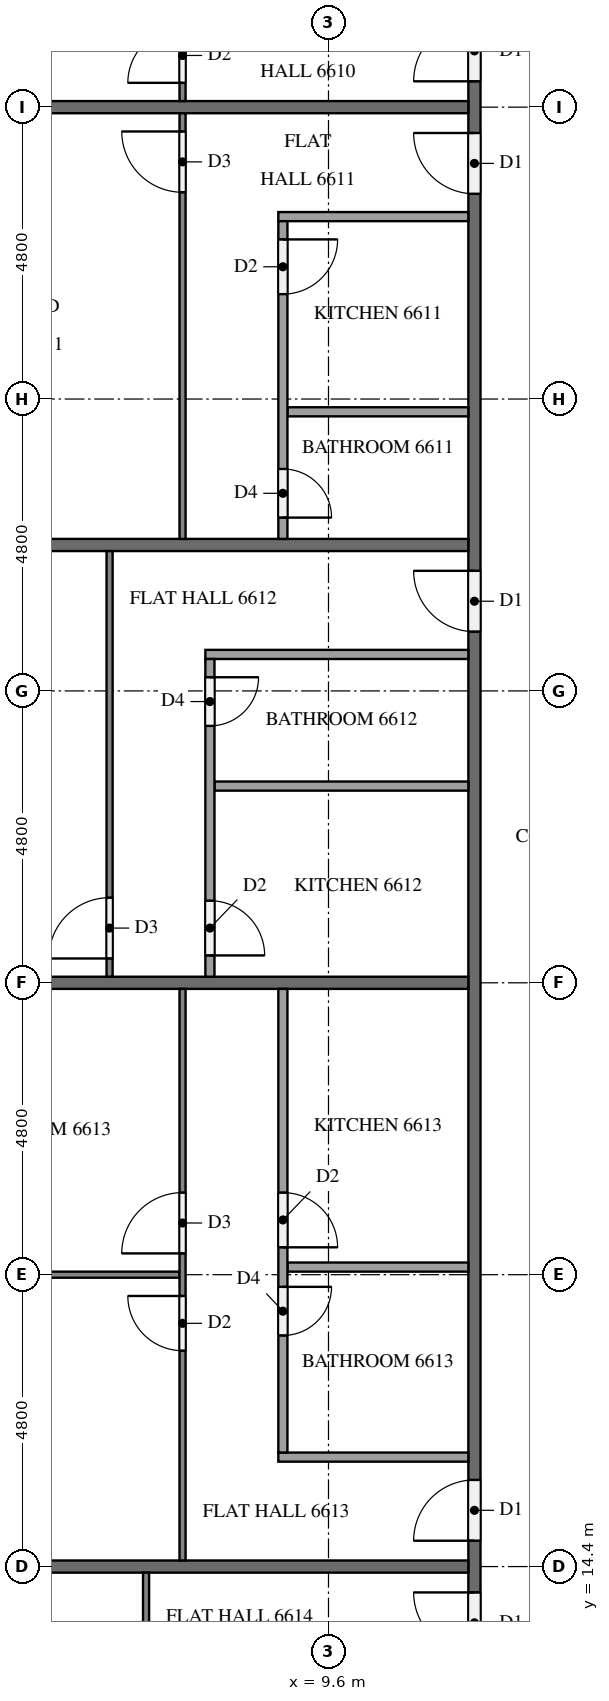
"""IFC4 building model, lengths in metres.
Left out: names, types, materials, properties, quantities, classifications, styles, units other than length and angle.
Written with IfcOpenShell. Run it as: python <this file> out.ifc"""

import sys

from ifc_helpers import new_model, si_unit, direction, frame, frame_2d, origin, place, context, subcontext, project, spatial, rectangle, extrude, element, fill, save


model = new_model("IFC4")
c1 = context("Model", 3, precision=1e-05, world=origin(), true_north=direction((0.0, 1.0)))
c2 = subcontext(c1, "Body", "Model", "MODEL_VIEW")
j1 = project(units=[si_unit("LENGTHUNIT", "METRE"), si_unit("PLANEANGLEUNIT", "RADIAN")], contexts=[c1])
p1 = place(None, origin())
s1 = spatial("IfcSite", under=j1, at=p1, CompositionType="ELEMENT")
p2 = place(p1, origin())
s2 = spatial("IfcBuilding", under=s1, at=p2, CompositionType="ELEMENT")
p3 = place(p2, frame((0.0, 0.0, 252.7)))
s3 = spatial("IfcBuildingStorey", under=s2, at=p3, CompositionType="ELEMENT", Elevation=252.7)
p4 = place(p3, frame((12.0, 12.1, 0.0), z_axis=(0.0, 0.0, 1.0), x_axis=(0.0, 1.0, 0.0)))
e1 = element("IfcWall", 1, at=p4, inside=s3, PredefinedType="PARTITIONING", context=c2, shape_type="SweptSolid", body=[
    extrude(rectangle(XDim=28.6, YDim=0.2, at=frame_2d((14.3, 0.0))), origin(), (0.0, 0.0, 1.0), 3.2),
])
p5 = place(p4, frame((26.725, 0.0, 0.0)))
e2 = element("IfcOpeningElement", 2, at=p5, cuts=e1, PredefinedType="OPENING", context=c2, shape_type="SweptSolid", body=[
    extrude(rectangle(XDim=1.0, YDim=2.1, at=frame_2d((0.5, 1.05))), frame((0.0, 0.11, 0.0), z_axis=(0.0, -1.0, 0.0), x_axis=(1.0, 0.0, 0.0)), (0.0, 0.0, 1.0), 0.22),
])
p6 = place(p4, frame((24.875, 0.0, 0.0)))
e3 = element("IfcOpeningElement", 3, at=p6, cuts=e1, PredefinedType="OPENING", context=c2, shape_type="SweptSolid", body=[
    extrude(rectangle(XDim=1.0, YDim=2.1, at=frame_2d((0.5, 1.05))), frame((0.0, 0.11, 0.0), z_axis=(0.0, -1.0, 0.0), x_axis=(1.0, 0.0, 0.0)), (0.0, 0.0, 1.0), 0.22),
])
p7 = place(p4, frame((17.675, 0.0, 0.0)))
e4 = element("IfcOpeningElement", 4, at=p7, cuts=e1, PredefinedType="OPENING", context=c2, shape_type="SweptSolid", body=[
    extrude(rectangle(XDim=1.0, YDim=2.1, at=frame_2d((0.5, 1.05))), frame((0.0, 0.11, 0.0), z_axis=(0.0, -1.0, 0.0), x_axis=(1.0, 0.0, 0.0)), (0.0, 0.0, 1.0), 0.22),
])
p8 = place(p4, frame((2.725, 0.0, 0.0)))
e5 = element("IfcOpeningElement", 5, at=p8, cuts=e1, PredefinedType="OPENING", context=c2, shape_type="SweptSolid", body=[
    extrude(rectangle(XDim=1.0, YDim=2.1, at=frame_2d((0.5, 1.05))), frame((0.0, 0.11, 0.0), z_axis=(0.0, -1.0, 0.0), x_axis=(1.0, 0.0, 0.0)), (0.0, 0.0, 1.0), 0.22),
])
p9 = place(p4, frame((0.875, 0.0, 0.0)))
e6 = element("IfcOpeningElement", 6, at=p9, cuts=e1, PredefinedType="OPENING", context=c2, shape_type="SweptSolid", body=[
    extrude(rectangle(XDim=1.0, YDim=2.1, at=frame_2d((0.5, 1.05))), frame((0.0, 0.11, 0.0), z_axis=(0.0, -1.0, 0.0), x_axis=(1.0, 0.0, 0.0)), (0.0, 0.0, 1.0), 0.22),
])
p10 = place(p3, frame((0.275, 38.4, 0.0), z_axis=(0.0, 0.0, 1.0), x_axis=(1.0, 0.0, 0.0)))
e7 = element("IfcWall", 7, at=p10, inside=s3, PredefinedType="PARTITIONING", context=c2, shape_type="SweptSolid", body=[
    extrude(rectangle(XDim=11.625, YDim=0.2, at=frame_2d((5.812, 0.0))), origin(), (0.0, 0.0, 1.0), 3.2),
])
for number, where, z_axis, x_axis in (
    (8, (0.1, 31.2, 0.0), (0.0, 0.0, 1.0), (1.0, 0.0, 0.0)),
    (9, (0.1, 24.0, 0.0), (0.0, 0.0, 1.0), (1.0, 0.0, 0.0)),
    (10, (0.1, 14.4, 0.0), (0.0, 0.0, 1.0), (1.0, 0.0, 0.0)),
):
    element("IfcWall", number, at=place(p3, frame(where, z_axis=z_axis, x_axis=x_axis)), inside=s3, PredefinedType="PARTITIONING", context=c2, shape_type="SweptSolid", body=[
        extrude(rectangle(XDim=11.8, YDim=0.2, at=frame_2d((5.9, 0.0))), origin(), (0.0, 0.0, 1.0), 3.2),
    ])
p11 = place(p3, frame((7.2, 38.5, 0.0), z_axis=(0.0, 0.0, 1.0), x_axis=(0.0, 1.0, 0.0)))
e11 = element("IfcWall", 11, at=p11, inside=s3, PredefinedType="PARTITIONING", context=c2, shape_type="SweptSolid", body=[
    extrude(rectangle(XDim=14.2, YDim=0.1, at=frame_2d((7.1, 0.0))), origin(), (0.0, 0.0, 1.0), 3.2),
])
p12 = place(p11, frame((0.3, 0.0, 0.0)))
e12 = element("IfcOpeningElement", 12, at=p12, cuts=e11, PredefinedType="OPENING", context=c2, shape_type="SweptSolid", body=[
    extrude(rectangle(XDim=0.9, YDim=2.1, at=frame_2d((0.45, 1.05))), frame((0.0, 0.06, 0.0), z_axis=(0.0, -1.0, 0.0), x_axis=(1.0, 0.0, 0.0)), (0.0, 0.0, 1.0), 0.12),
])
p13 = place(p11, frame((8.25, 0.0, 0.0)))
e13 = element("IfcOpeningElement", 13, at=p13, cuts=e11, PredefinedType="OPENING", context=c2, shape_type="SweptSolid", body=[
    extrude(rectangle(XDim=0.9, YDim=2.1, at=frame_2d((0.45, 1.05))), frame((0.0, 0.06, 0.0), z_axis=(0.0, -1.0, 0.0), x_axis=(1.0, 0.0, 0.0)), (0.0, 0.0, 1.0), 0.12),
])
p14 = place(p11, frame((9.85, 0.0, 0.0)))
e14 = element("IfcOpeningElement", 14, at=p14, cuts=e11, PredefinedType="OPENING", context=c2, shape_type="SweptSolid", body=[
    extrude(rectangle(XDim=1.0, YDim=2.1, at=frame_2d((0.5, 1.05))), frame((0.0, 0.06, 0.0), z_axis=(0.0, -1.0, 0.0), x_axis=(1.0, 0.0, 0.0)), (0.0, 0.0, 1.0), 0.12),
])
p15 = place(p3, frame((7.2, 31.3, 0.0), z_axis=(0.0, 0.0, 1.0), x_axis=(0.0, 1.0, 0.0)))
e15 = element("IfcWall", 15, at=p15, inside=s3, PredefinedType="PARTITIONING", context=c2, shape_type="SweptSolid", body=[
    extrude(rectangle(XDim=7.0, YDim=0.1, at=frame_2d((3.5, 0.0))), origin(), (0.0, 0.0, 1.0), 3.2),
])
p16 = place(p15, frame((5.7, 0.0, 0.0)))
e16 = element("IfcOpeningElement", 16, at=p16, cuts=e15, PredefinedType="OPENING", context=c2, shape_type="SweptSolid", body=[
    extrude(rectangle(XDim=1.0, YDim=2.1, at=frame_2d((0.5, 1.05))), frame((0.0, 0.06, 0.0), z_axis=(0.0, -1.0, 0.0), x_axis=(1.0, 0.0, 0.0)), (0.0, 0.0, 1.0), 0.12),
])
p17 = place(p3, frame((11.9, 33.39, 0.0), z_axis=(0.0, 0.0, 1.0), x_axis=(-1.0, 0.0, 0.0)))
e17 = element("IfcWall", 17, at=p17, inside=s3, PredefinedType="PARTITIONING", context=c2, shape_type="SweptSolid", body=[
    extrude(rectangle(XDim=2.975, YDim=0.15, at=frame_2d((1.487, 0.0))), origin(), (0.0, 0.0, 1.0), 3.2),
])
p18 = place(p3, frame((11.9, 36.6, 0.0), z_axis=(0.0, 0.0, 1.0), x_axis=(-1.0, 0.0, 0.0)))
e18 = element("IfcWall", 18, at=p18, inside=s3, PredefinedType="PARTITIONING", context=c2, shape_type="SweptSolid", body=[
    extrude(rectangle(XDim=3.125, YDim=0.15, at=frame_2d((1.562, 0.0))), origin(), (0.0, 0.0, 1.0), 3.2),
])
p19 = place(p3, frame((8.85, 36.525, 0.0), z_axis=(0.0, 0.0, 1.0), x_axis=(0.0, -1.0, 0.0)))
e19 = element("IfcWall", 19, at=p19, inside=s3, PredefinedType="PARTITIONING", context=c2, shape_type="SweptSolid", body=[
    extrude(rectangle(XDim=5.225, YDim=0.15, at=frame_2d((2.612, 0.0))), origin(), (0.0, 0.0, 1.0), 3.2),
])
p20 = place(p19, frame((0.3, 0.0, 0.0)))
e20 = element("IfcOpeningElement", 20, at=p20, cuts=e19, PredefinedType="OPENING", context=c2, shape_type="SweptSolid", body=[
    extrude(rectangle(XDim=0.9, YDim=2.1, at=frame_2d((0.45, 1.05))), frame((0.0, 0.085, 0.0), z_axis=(0.0, -1.0, 0.0), x_axis=(1.0, 0.0, 0.0)), (0.0, 0.0, 1.0), 0.17),
])
p21 = place(p19, frame((4.075, 0.0, 0.0)))
e21 = element("IfcOpeningElement", 21, at=p21, cuts=e19, PredefinedType="OPENING", context=c2, shape_type="SweptSolid", body=[
    extrude(rectangle(XDim=0.8, YDim=2.1, at=frame_2d((0.4, 1.05))), frame((0.0, 0.085, 0.0), z_axis=(0.0, -1.0, 0.0), x_axis=(1.0, 0.0, 0.0)), (0.0, 0.0, 1.0), 0.17),
])
p22 = place(p3, frame((6.0, 24.1, 0.0), z_axis=(0.0, 0.0, 1.0), x_axis=(0.0, 1.0, 0.0)))
e22 = element("IfcWall", 22, at=p22, inside=s3, PredefinedType="PARTITIONING", context=c2, shape_type="SweptSolid", body=[
    extrude(rectangle(XDim=7.0, YDim=0.1, at=frame_2d((3.5, 0.0))), origin(), (0.0, 0.0, 1.0), 3.2),
])
p23 = place(p22, frame((0.3, 0.0, 0.0)))
e23 = element("IfcOpeningElement", 23, at=p23, cuts=e22, PredefinedType="OPENING", context=c2, shape_type="SweptSolid", body=[
    extrude(rectangle(XDim=1.0, YDim=2.1, at=frame_2d((0.5, 1.05))), frame((0.0, 0.06, 0.0), z_axis=(0.0, -1.0, 0.0), x_axis=(1.0, 0.0, 0.0)), (0.0, 0.0, 1.0), 0.12),
])
p24 = place(p3, frame((11.9, 27.235, 0.0), z_axis=(0.0, 0.0, 1.0), x_axis=(-1.0, 0.0, 0.0)))
e24 = element("IfcWall", 24, at=p24, inside=s3, PredefinedType="PARTITIONING", context=c2, shape_type="SweptSolid", body=[
    extrude(rectangle(XDim=4.175, YDim=0.15, at=frame_2d((2.087, 0.0))), origin(), (0.0, 0.0, 1.0), 3.2),
])
p25 = place(p3, frame((11.9, 29.4, 0.0), z_axis=(0.0, 0.0, 1.0), x_axis=(-1.0, 0.0, 0.0)))
e25 = element("IfcWall", 25, at=p25, inside=s3, PredefinedType="PARTITIONING", context=c2, shape_type="SweptSolid", body=[
    extrude(rectangle(XDim=4.325, YDim=0.15, at=frame_2d((2.163, 0.0))), origin(), (0.0, 0.0, 1.0), 3.2),
])
p26 = place(p3, frame((7.65, 29.325, 0.0), z_axis=(0.0, 0.0, 1.0), x_axis=(0.0, -1.0, 0.0)))
e26 = element("IfcWall", 26, at=p26, inside=s3, PredefinedType="PARTITIONING", context=c2, shape_type="SweptSolid", body=[
    extrude(rectangle(XDim=5.225, YDim=0.15, at=frame_2d((2.612, 0.0))), origin(), (0.0, 0.0, 1.0), 3.2),
])
p27 = place(p26, frame((0.3, 0.0, 0.0)))
e27 = element("IfcOpeningElement", 27, at=p27, cuts=e26, PredefinedType="OPENING", context=c2, shape_type="SweptSolid", body=[
    extrude(rectangle(XDim=0.8, YDim=2.1, at=frame_2d((0.4, 1.05))), frame((0.0, 0.085, 0.0), z_axis=(0.0, -1.0, 0.0), x_axis=(1.0, 0.0, 0.0)), (0.0, 0.0, 1.0), 0.17),
])
p28 = place(p26, frame((3.975, 0.0, 0.0)))
e28 = element("IfcOpeningElement", 28, at=p28, cuts=e26, PredefinedType="OPENING", context=c2, shape_type="SweptSolid", body=[
    extrude(rectangle(XDim=0.9, YDim=2.1, at=frame_2d((0.45, 1.05))), frame((0.0, 0.085, 0.0), z_axis=(0.0, -1.0, 0.0), x_axis=(1.0, 0.0, 0.0)), (0.0, 0.0, 1.0), 0.17),
])
p29 = place(p3, frame((7.15, 19.2, 0.0), z_axis=(0.0, 0.0, 1.0), x_axis=(-1.0, 0.0, 0.0)))
e29 = element("IfcWall", 29, at=p29, inside=s3, PredefinedType="PARTITIONING", context=c2, shape_type="SweptSolid", body=[
    extrude(rectangle(XDim=6.875, YDim=0.1, at=frame_2d((3.438, 0.0))), origin(), (0.0, 0.0, 1.0), 3.2),
])
p30 = place(p3, frame((7.2, 14.5, 0.0), z_axis=(0.0, 0.0, 1.0), x_axis=(0.0, 1.0, 0.0)))
e30 = element("IfcWall", 30, at=p30, inside=s3, PredefinedType="PARTITIONING", context=c2, shape_type="SweptSolid", body=[
    extrude(rectangle(XDim=9.4, YDim=0.1, at=frame_2d((4.7, 0.0))), origin(), (0.0, 0.0, 1.0), 3.2),
])
p31 = place(p30, frame((3.45, 0.0, 0.0)))
e31 = element("IfcOpeningElement", 31, at=p31, cuts=e30, PredefinedType="OPENING", context=c2, shape_type="SweptSolid", body=[
    extrude(rectangle(XDim=0.9, YDim=2.1, at=frame_2d((0.45, 1.05))), frame((0.0, 0.06, 0.0), z_axis=(0.0, -1.0, 0.0), x_axis=(1.0, 0.0, 0.0)), (0.0, 0.0, 1.0), 0.12),
])
p32 = place(p30, frame((5.05, 0.0, 0.0)))
e32 = element("IfcOpeningElement", 32, at=p32, cuts=e30, PredefinedType="OPENING", context=c2, shape_type="SweptSolid", body=[
    extrude(rectangle(XDim=1.0, YDim=2.1, at=frame_2d((0.5, 1.05))), frame((0.0, 0.06, 0.0), z_axis=(0.0, -1.0, 0.0), x_axis=(1.0, 0.0, 0.0)), (0.0, 0.0, 1.0), 0.12),
])
p33 = place(p3, frame((11.9, 19.325, 0.0), z_axis=(0.0, 0.0, 1.0), x_axis=(-1.0, 0.0, 0.0)))
e33 = element("IfcWall", 33, at=p33, inside=s3, PredefinedType="PARTITIONING", context=c2, shape_type="SweptSolid", body=[
    extrude(rectangle(XDim=2.975, YDim=0.15, at=frame_2d((1.487, 0.0))), origin(), (0.0, 0.0, 1.0), 3.2),
])
p34 = place(p3, frame((11.9, 16.2, 0.0), z_axis=(0.0, 0.0, 1.0), x_axis=(-1.0, 0.0, 0.0)))
e34 = element("IfcWall", 34, at=p34, inside=s3, PredefinedType="PARTITIONING", context=c2, shape_type="SweptSolid", body=[
    extrude(rectangle(XDim=3.125, YDim=0.15, at=frame_2d((1.562, 0.0))), origin(), (0.0, 0.0, 1.0), 3.2),
])
p35 = place(p3, frame((8.85, 23.9, 0.0), z_axis=(0.0, 0.0, 1.0), x_axis=(0.0, -1.0, 0.0)))
e35 = element("IfcWall", 35, at=p35, inside=s3, PredefinedType="PARTITIONING", context=c2, shape_type="SweptSolid", body=[
    extrude(rectangle(XDim=7.625, YDim=0.15, at=frame_2d((3.812, 0.0))), origin(), (0.0, 0.0, 1.0), 3.2),
])
p36 = place(p35, frame((4.9, 0.0, 0.0)))
e36 = element("IfcOpeningElement", 36, at=p36, cuts=e35, PredefinedType="OPENING", context=c2, shape_type="SweptSolid", body=[
    extrude(rectangle(XDim=0.8, YDim=2.1, at=frame_2d((0.4, 1.05))), frame((0.0, 0.085, 0.0), z_axis=(0.0, -1.0, 0.0), x_axis=(1.0, 0.0, 0.0)), (0.0, 0.0, 1.0), 0.17),
])
p37 = place(p35, frame((3.35, 0.0, 0.0)))
e37 = element("IfcOpeningElement", 37, at=p37, cuts=e35, PredefinedType="OPENING", context=c2, shape_type="SweptSolid", body=[
    extrude(rectangle(XDim=0.9, YDim=2.1, at=frame_2d((0.45, 1.05))), frame((0.0, 0.085, 0.0), z_axis=(0.0, -1.0, 0.0), x_axis=(1.0, 0.0, 0.0)), (0.0, 0.0, 1.0), 0.17),
])
p38 = place(p3, frame((6.6, 4.9, 0.0), z_axis=(0.0, 0.0, 1.0), x_axis=(0.0, 1.0, 0.0)))
e38 = element("IfcWall", 38, at=p38, inside=s3, PredefinedType="PARTITIONING", context=c2, shape_type="SweptSolid", body=[
    extrude(rectangle(XDim=9.4, YDim=0.1, at=frame_2d((4.7, 0.0))), origin(), (0.0, 0.0, 1.0), 3.2),
])
p39 = place(p38, frame((5.05, 0.0, 0.0)))
e39 = element("IfcOpeningElement", 39, at=p39, cuts=e38, PredefinedType="OPENING", context=c2, shape_type="SweptSolid", body=[
    extrude(rectangle(XDim=0.9, YDim=2.1, at=frame_2d((0.45, 1.05))), frame((0.0, 0.06, 0.0), z_axis=(0.0, -1.0, 0.0), x_axis=(1.0, 0.0, 0.0)), (0.0, 0.0, 1.0), 0.12),
])
p40 = place(p38, frame((3.35, 0.0, 0.0)))
e40 = element("IfcOpeningElement", 40, at=p40, cuts=e38, PredefinedType="OPENING", context=c2, shape_type="SweptSolid", body=[
    extrude(rectangle(XDim=1.0, YDim=2.1, at=frame_2d((0.5, 1.05))), frame((0.0, 0.06, 0.0), z_axis=(0.0, -1.0, 0.0), x_axis=(1.0, 0.0, 0.0)), (0.0, 0.0, 1.0), 0.12),
])
p41 = place(p5, origin())
e41 = element("IfcDoor", 41, at=p41, inside=s3, OperationType="SINGLE_SWING_LEFT", PredefinedType="DOOR", context=c2, shape_type="SweptSolid", body=[
    extrude(rectangle(XDim=1.0, YDim=2.1, at=frame_2d((0.5, 1.05))), frame((0.0, 0.025, 0.0), z_axis=(0.0, -1.0, 0.0), x_axis=(1.0, 0.0, 0.0)), (0.0, 0.0, 1.0), 0.05),
])
fill(e2, e41)
p42 = place(p6, origin())
e42 = element("IfcDoor", 42, at=p42, inside=s3, OperationType="SINGLE_SWING_RIGHT", PredefinedType="DOOR", context=c2, shape_type="SweptSolid", body=[
    extrude(rectangle(XDim=1.0, YDim=2.1, at=frame_2d((0.5, 1.05))), frame((0.0, 0.025, 0.0), z_axis=(0.0, -1.0, 0.0), x_axis=(1.0, 0.0, 0.0)), (0.0, 0.0, 1.0), 0.05),
])
fill(e3, e42)
p43 = place(p7, origin())
e43 = element("IfcDoor", 43, at=p43, inside=s3, OperationType="SINGLE_SWING_RIGHT", PredefinedType="DOOR", context=c2, shape_type="SweptSolid", body=[
    extrude(rectangle(XDim=1.0, YDim=2.1, at=frame_2d((0.5, 1.05))), frame((0.0, 0.025, 0.0), z_axis=(0.0, -1.0, 0.0), x_axis=(1.0, 0.0, 0.0)), (0.0, 0.0, 1.0), 0.05),
])
fill(e4, e43)
p44 = place(p8, origin())
e44 = element("IfcDoor", 44, at=p44, inside=s3, OperationType="SINGLE_SWING_LEFT", PredefinedType="DOOR", context=c2, shape_type="SweptSolid", body=[
    extrude(rectangle(XDim=1.0, YDim=2.1, at=frame_2d((0.5, 1.05))), frame((0.0, 0.025, 0.0), z_axis=(0.0, -1.0, 0.0), x_axis=(1.0, 0.0, 0.0)), (0.0, 0.0, 1.0), 0.05),
])
fill(e5, e44)
p45 = place(p9, origin())
e45 = element("IfcDoor", 45, at=p45, inside=s3, OperationType="SINGLE_SWING_RIGHT", PredefinedType="DOOR", context=c2, shape_type="SweptSolid", body=[
    extrude(rectangle(XDim=1.0, YDim=2.1, at=frame_2d((0.5, 1.05))), frame((0.0, 0.025, 0.0), z_axis=(0.0, -1.0, 0.0), x_axis=(1.0, 0.0, 0.0)), (0.0, 0.0, 1.0), 0.05),
])
fill(e6, e45)
p46 = place(p12, origin())
e46 = element("IfcDoor", 46, at=p46, inside=s3, OperationType="SINGLE_SWING_LEFT", PredefinedType="DOOR", context=c2, shape_type="SweptSolid", body=[
    extrude(rectangle(XDim=0.9, YDim=2.1, at=frame_2d((0.45, 1.05))), frame((0.0, 0.025, 0.0), z_axis=(0.0, -1.0, 0.0), x_axis=(1.0, 0.0, 0.0)), (0.0, 0.0, 1.0), 0.05),
])
fill(e12, e46)
p47 = place(p16, origin())
e47 = element("IfcDoor", 47, at=p47, inside=s3, OperationType="SINGLE_SWING_RIGHT", PredefinedType="DOOR", context=c2, shape_type="SweptSolid", body=[
    extrude(rectangle(XDim=1.0, YDim=2.1, at=frame_2d((0.5, 1.05))), frame((0.0, 0.025, 0.0), z_axis=(0.0, -1.0, 0.0), x_axis=(1.0, 0.0, 0.0)), (0.0, 0.0, 1.0), 0.05),
])
fill(e16, e47)
p48 = place(p20, origin())
e48 = element("IfcDoor", 48, at=p48, inside=s3, OperationType="SINGLE_SWING_LEFT", PredefinedType="DOOR", context=c2, shape_type="SweptSolid", body=[
    extrude(rectangle(XDim=0.9, YDim=2.1, at=frame_2d((0.45, 1.05))), frame((0.0, 0.025, 0.0), z_axis=(0.0, -1.0, 0.0), x_axis=(1.0, 0.0, 0.0)), (0.0, 0.0, 1.0), 0.05),
])
fill(e20, e48)
p49 = place(p21, origin())
e49 = element("IfcDoor", 49, at=p49, inside=s3, OperationType="SINGLE_SWING_RIGHT", PredefinedType="DOOR", context=c2, shape_type="SweptSolid", body=[
    extrude(rectangle(XDim=0.8, YDim=2.1, at=frame_2d((0.4, 1.05))), frame((0.0, 0.025, 0.0), z_axis=(0.0, -1.0, 0.0), x_axis=(1.0, 0.0, 0.0)), (0.0, 0.0, 1.0), 0.05),
])
fill(e21, e49)
p50 = place(p23, origin())
e50 = element("IfcDoor", 50, at=p50, inside=s3, OperationType="SINGLE_SWING_LEFT", PredefinedType="DOOR", context=c2, shape_type="SweptSolid", body=[
    extrude(rectangle(XDim=1.0, YDim=2.1, at=frame_2d((0.5, 1.05))), frame((0.0, 0.025, 0.0), z_axis=(0.0, -1.0, 0.0), x_axis=(1.0, 0.0, 0.0)), (0.0, 0.0, 1.0), 0.05),
])
fill(e23, e50)
p51 = place(p27, origin())
e51 = element("IfcDoor", 51, at=p51, inside=s3, OperationType="SINGLE_SWING_LEFT", PredefinedType="DOOR", context=c2, shape_type="SweptSolid", body=[
    extrude(rectangle(XDim=0.8, YDim=2.1, at=frame_2d((0.4, 1.05))), frame((0.0, 0.025, 0.0), z_axis=(0.0, -1.0, 0.0), x_axis=(1.0, 0.0, 0.0)), (0.0, 0.0, 1.0), 0.05),
])
fill(e27, e51)
p52 = place(p28, origin())
e52 = element("IfcDoor", 52, at=p52, inside=s3, OperationType="SINGLE_SWING_RIGHT", PredefinedType="DOOR", context=c2, shape_type="SweptSolid", body=[
    extrude(rectangle(XDim=0.9, YDim=2.1, at=frame_2d((0.45, 1.05))), frame((0.0, 0.025, 0.0), z_axis=(0.0, -1.0, 0.0), x_axis=(1.0, 0.0, 0.0)), (0.0, 0.0, 1.0), 0.05),
])
fill(e28, e52)
p53 = place(p31, origin())
e53 = element("IfcDoor", 53, at=p53, inside=s3, OperationType="SINGLE_SWING_RIGHT", PredefinedType="DOOR", context=c2, shape_type="SweptSolid", body=[
    extrude(rectangle(XDim=0.9, YDim=2.1, at=frame_2d((0.45, 1.05))), frame((0.0, 0.025, 0.0), z_axis=(0.0, -1.0, 0.0), x_axis=(1.0, 0.0, 0.0)), (0.0, 0.0, 1.0), 0.05),
])
fill(e31, e53)
p54 = place(p32, origin())
e54 = element("IfcDoor", 54, at=p54, inside=s3, OperationType="SINGLE_SWING_LEFT", PredefinedType="DOOR", context=c2, shape_type="SweptSolid", body=[
    extrude(rectangle(XDim=1.0, YDim=2.1, at=frame_2d((0.5, 1.05))), frame((0.0, 0.025, 0.0), z_axis=(0.0, -1.0, 0.0), x_axis=(1.0, 0.0, 0.0)), (0.0, 0.0, 1.0), 0.05),
])
fill(e32, e54)
p55 = place(p36, origin())
e55 = element("IfcDoor", 55, at=p55, inside=s3, OperationType="SINGLE_SWING_LEFT", PredefinedType="DOOR", context=c2, shape_type="SweptSolid", body=[
    extrude(rectangle(XDim=0.8, YDim=2.1, at=frame_2d((0.4, 1.05))), frame((0.0, 0.025, 0.0), z_axis=(0.0, -1.0, 0.0), x_axis=(1.0, 0.0, 0.0)), (0.0, 0.0, 1.0), 0.05),
])
fill(e36, e55)
p56 = place(p37, origin())
e56 = element("IfcDoor", 56, at=p56, inside=s3, OperationType="SINGLE_SWING_RIGHT", PredefinedType="DOOR", context=c2, shape_type="SweptSolid", body=[
    extrude(rectangle(XDim=0.9, YDim=2.1, at=frame_2d((0.45, 1.05))), frame((0.0, 0.025, 0.0), z_axis=(0.0, -1.0, 0.0), x_axis=(1.0, 0.0, 0.0)), (0.0, 0.0, 1.0), 0.05),
])
fill(e37, e56)
save(model, sys.argv[1])
